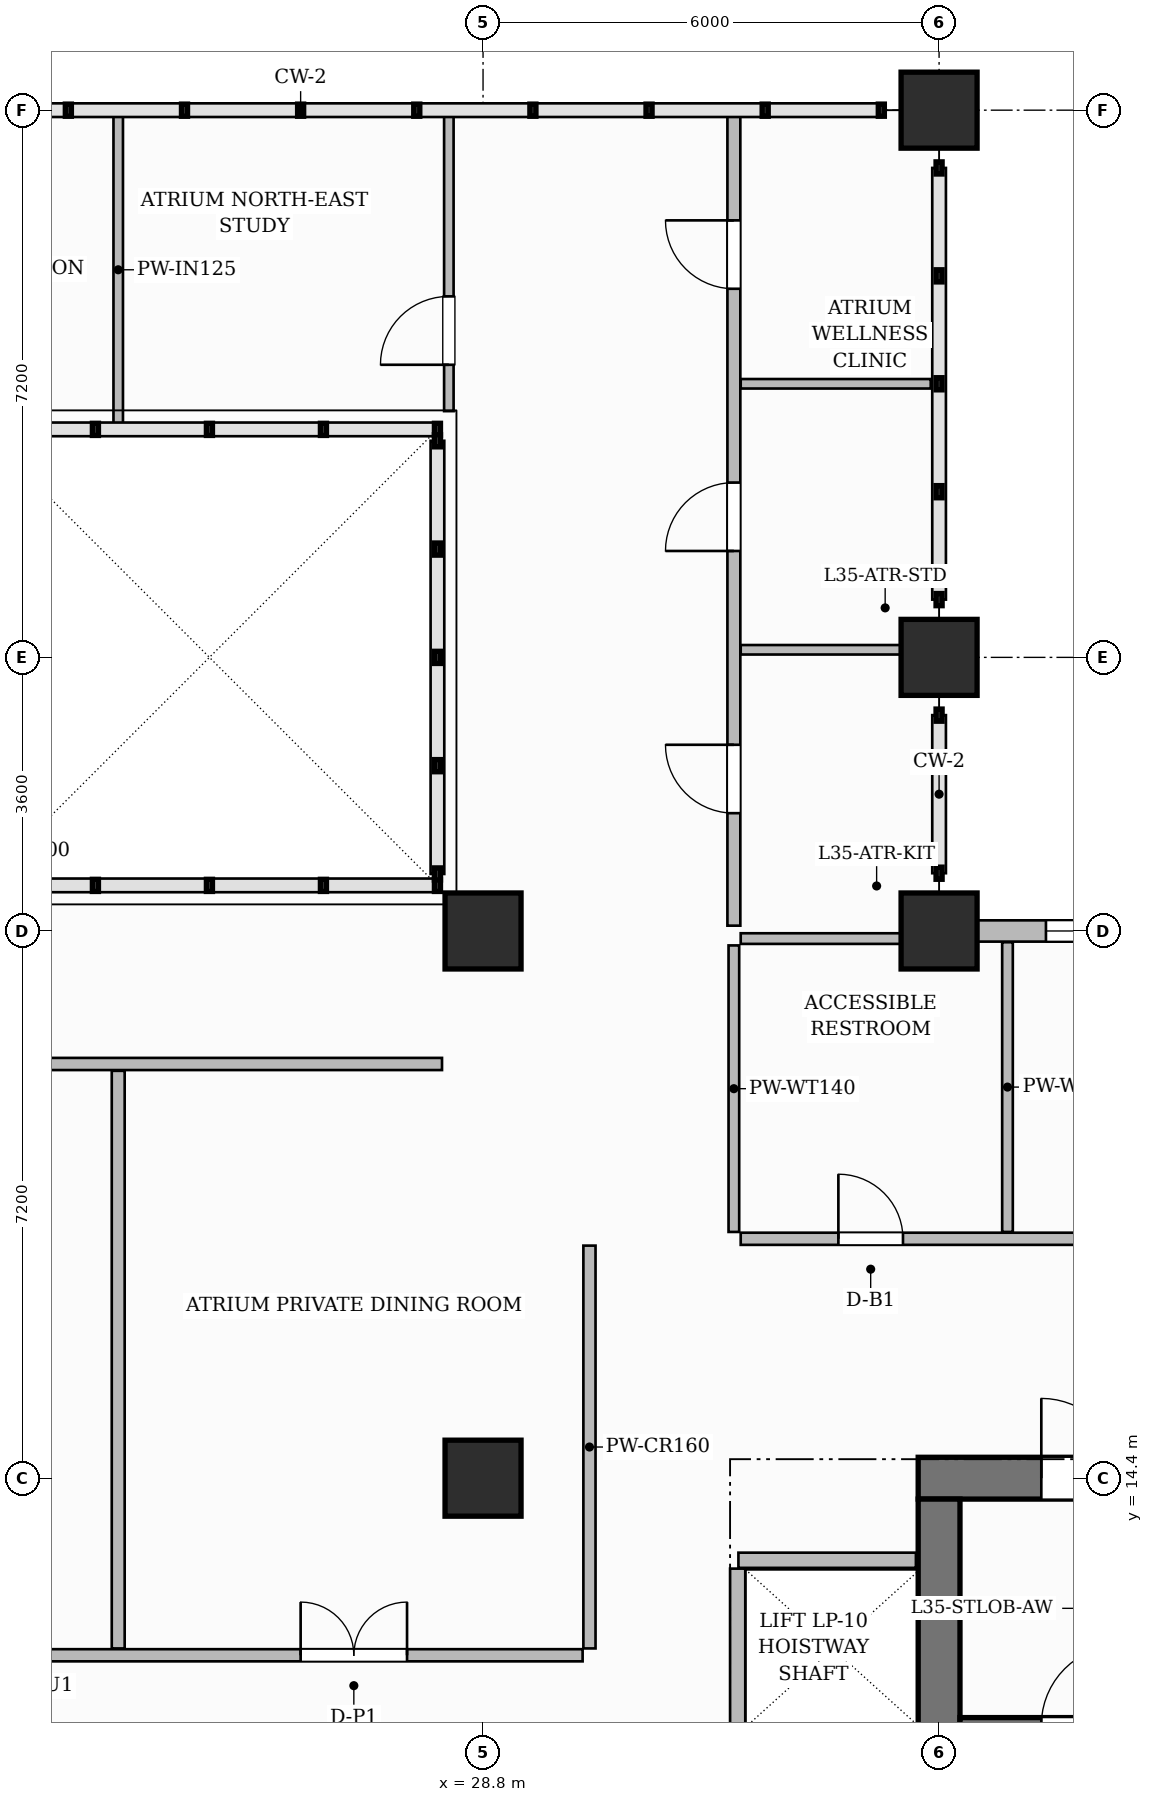
"""IFC4 building model, lengths in metres.
Left out: names, types, materials, properties, quantities, classifications, styles, units other than length and angle.
Written with IfcOpenShell. Run it as: python <this file> out.ifc"""

import sys

from ifc_helpers import new_model, si_unit, direction, frame, frame_2d, origin, origin_2d, place, context, subcontext, project, spatial, rectangle, extrude, source, transform, mapped, element, fill, save


model = new_model("IFC4")
c1 = context("Model", 3, precision=1e-05, world=origin(), true_north=direction((0.0, 1.0)))
c2 = subcontext(c1, "Body", "Model", "MODEL_VIEW")
j1 = project(units=[si_unit("LENGTHUNIT", "METRE"), si_unit("PLANEANGLEUNIT", "RADIAN")], contexts=[c1])
p1 = place(None, origin())
s1 = spatial("IfcSite", under=j1, at=p1, CompositionType="ELEMENT")
p2 = place(p1, origin())
s2 = spatial("IfcBuilding", under=s1, at=p2, CompositionType="ELEMENT")
p3 = place(p2, frame((0.0, 0.0, 141.4)))
s3 = spatial("IfcBuildingStorey", under=s2, at=p3, CompositionType="ELEMENT", Elevation=141.4)
p4 = place(p3, frame((34.525, 14.4, 0.0), z_axis=(0.0, 0.0, 1.0), x_axis=(1.0, 0.0, 0.0)))
e1 = element("IfcWall", 1, at=p4, inside=s3, PredefinedType="SHEAR", context=c2, shape_type="SweptSolid", body=[
    extrude(rectangle(XDim=15.55, YDim=0.55, at=frame_2d((7.775, 0.0))), origin(), (0.0, 0.0, 1.0), 3.7),
])
p5 = place(p4, frame((5.405, 0.0, 0.0)))
e2 = element("IfcOpeningElement", 2, at=p5, cuts=e1, PredefinedType="OPENING", context=c2, shape_type="SweptSolid", body=[
    extrude(rectangle(XDim=1.5, YDim=2.2, at=frame_2d((0.75, 1.1))), frame((0.0, 0.285, 0.0), z_axis=(0.0, -1.0, 0.0), x_axis=(1.0, 0.0, 0.0)), (0.0, 0.0, 1.0), 0.57),
])
p6 = place(p4, frame((1.62, 0.0, 0.0)))
e3 = element("IfcOpeningElement", 3, at=p6, cuts=e1, PredefinedType="OPENING", context=c2, shape_type="SweptSolid", body=[
    extrude(rectangle(XDim=1.05, YDim=2.15, at=frame_2d((0.525, 1.075))), frame((0.0, 0.285, 0.0), z_axis=(0.0, -1.0, 0.0), x_axis=(1.0, 0.0, 0.0)), (0.0, 0.0, 1.0), 0.57),
])
p7 = place(p4, frame((11.25, 0.0, 0.0)))
e4 = element("IfcOpeningElement", 4, at=p7, cuts=e1, PredefinedType="OPENING", context=c2, shape_type="SweptSolid", body=[
    extrude(rectangle(XDim=1.05, YDim=2.15, at=frame_2d((0.525, 1.075))), frame((0.0, 0.285, 0.0), z_axis=(0.0, -1.0, 0.0), x_axis=(1.0, 0.0, 0.0)), (0.0, 0.0, 1.0), 0.57),
])
p8 = place(p3, frame((34.8, 3.875, 0.0), z_axis=(0.0, 0.0, 1.0), x_axis=(0.0, 1.0, 0.0)))
e5 = element("IfcWall", 5, at=p8, inside=s3, PredefinedType="SHEAR", context=c2, shape_type="SweptSolid", body=[
    extrude(rectangle(XDim=10.25, YDim=0.55, at=frame_2d((5.125, 0.0))), origin(), (0.0, 0.0, 1.0), 3.7),
])
m1 = source(origin(), c2, "Body", "SweptSolid", [
    extrude(rectangle(XDim=1.0, YDim=1.0, at=origin_2d()), origin(), (0.0, 0.0, 1.0), 3.7),
])
for number, where, z_axis, x_axis in (
    (6, (28.8, 14.4, 0.0), (0.0, 0.0, 1.0), (1.0, 0.0, 0.0)),
    (7, (28.8, 21.6, 0.0), (0.0, 0.0, 1.0), (1.0, 0.0, 0.0)),
    (8, (34.8, 21.6, 0.0), (0.0, 0.0, 1.0), (1.0, 0.0, 0.0)),
    (9, (34.8, 25.2, 0.0), (0.0, 0.0, 1.0), (1.0, 0.0, 0.0)),
    (10, (34.8, 32.4, 0.0), (0.0, 0.0, 1.0), (1.0, 0.0, 0.0)),
):
    element("IfcColumn", number, at=place(p3, frame(where, z_axis=z_axis, x_axis=x_axis)), inside=s3, PredefinedType="COLUMN", context=c2, shape_type="MappedRepresentation", body=[
        mapped(m1, transform((0.0, 0.0, 0.0), scale=1.0)),
    ])
p9 = place(p3, frame((35.075, 11.15, 0.0), z_axis=(0.0, 0.0, 1.0), x_axis=(1.0, 0.0, 0.0)))
e11 = element("IfcWall", 11, at=p9, inside=s3, PredefinedType="SHEAR", context=c2, shape_type="SweptSolid", body=[
    extrude(rectangle(XDim=3.165, YDim=0.2, at=frame_2d((1.583, 0.0))), origin(), (0.0, 0.0, 1.0), 3.7),
])
p10 = place(p9, frame((1.07, 0.0, 0.0)))
e12 = element("IfcOpeningElement", 12, at=p10, cuts=e11, PredefinedType="OPENING", context=c2, shape_type="SweptSolid", body=[
    extrude(rectangle(XDim=1.05, YDim=2.2, at=frame_2d((0.525, 1.1))), frame((0.0, 0.11, 0.0), z_axis=(0.0, -1.0, 0.0), x_axis=(1.0, 0.0, 0.0)), (0.0, 0.0, 1.0), 0.22),
])
p11 = place(p3, frame((32.16, 13.32, 0.0), z_axis=(0.0, 0.0, 1.0), x_axis=(1.0, 0.0, 0.0)))
e13 = element("IfcWall", 13, at=p11, inside=s3, PredefinedType="PARTITIONING", context=c2, shape_type="SweptSolid", body=[
    extrude(rectangle(XDim=2.335, YDim=0.2, at=frame_2d((1.167, 0.0))), origin(), (0.0, 0.0, 1.0), 3.4),
])
p12 = place(p3, frame((32.15, 4.39, 0.0), z_axis=(0.0, 0.0, 1.0), x_axis=(0.0, 1.0, 0.0)))
e14 = element("IfcWall", 14, at=p12, inside=s3, PredefinedType="PARTITIONING", context=c2, shape_type="SweptSolid", body=[
    extrude(rectangle(XDim=8.82, YDim=0.2, at=frame_2d((4.41, 0.0))), origin(), (0.0, 0.0, 1.0), 3.4),
])
p13 = place(p3, frame((14.548, 12.07, 0.0), z_axis=(0.0, 0.0, 1.0), x_axis=(1.0, 0.0, 0.0)))
e15 = element("IfcWall", 15, at=p13, inside=s3, PredefinedType="PARTITIONING", context=c2, shape_type="SweptSolid", body=[
    extrude(rectangle(XDim=15.562, YDim=0.16, at=frame_2d((7.781, 0.0))), origin(), (0.0, 0.0, 1.0), 3.4),
])
p14 = place(p13, frame((6.702, 0.0, 0.0)))
e16 = element("IfcOpeningElement", 16, at=p14, cuts=e15, PredefinedType="OPENING", context=c2, shape_type="SweptSolid", body=[
    extrude(rectangle(XDim=1.05, YDim=2.25, at=frame_2d((0.525, 1.125))), frame((0.0, 0.09, 0.0), z_axis=(0.0, -1.0, 0.0), x_axis=(1.0, 0.0, 0.0)), (0.0, 0.0, 1.0), 0.18),
])
p15 = place(p13, frame((11.852, 0.0, 0.0)))
e17 = element("IfcOpeningElement", 17, at=p15, cuts=e15, PredefinedType="OPENING", context=c2, shape_type="SweptSolid", body=[
    extrude(rectangle(XDim=1.4, YDim=2.35, at=frame_2d((0.7, 1.175))), frame((0.0, 0.09, 0.0), z_axis=(0.0, -1.0, 0.0), x_axis=(1.0, 0.0, 0.0)), (0.0, 0.0, 1.0), 0.18),
])
p16 = place(p3, frame((30.2, 12.16, 0.0), z_axis=(0.0, 0.0, 1.0), x_axis=(0.0, 1.0, 0.0)))
e18 = element("IfcWall", 18, at=p16, inside=s3, PredefinedType="PARTITIONING", context=c2, shape_type="SweptSolid", body=[
    extrude(rectangle(XDim=5.3, YDim=0.16, at=frame_2d((2.65, 0.0))), origin(), (0.0, 0.0, 1.0), 3.4),
])
p17 = place(p3, frame((32.19, 17.55, 0.0), z_axis=(0.0, 0.0, 1.0), x_axis=(1.0, 0.0, 0.0)))
e19 = element("IfcWall", 19, at=p17, inside=s3, PredefinedType="PARTITIONING", context=c2, shape_type="SweptSolid", body=[
    extrude(rectangle(XDim=17.47, YDim=0.16, at=frame_2d((8.735, 0.0))), origin(), (0.0, 0.0, 1.0), 3.4),
])
p18 = place(p17, frame((1.285, 0.0, 0.0)))
e20 = element("IfcOpeningElement", 20, at=p18, cuts=e19, PredefinedType="OPENING", context=c2, shape_type="SweptSolid", body=[
    extrude(rectangle(XDim=0.85, YDim=2.1, at=frame_2d((0.425, 1.05))), frame((0.0, 0.09, 0.0), z_axis=(0.0, -1.0, 0.0), x_axis=(1.0, 0.0, 0.0)), (0.0, 0.0, 1.0), 0.18),
])
p19 = place(p17, frame((9.71, 0.0, 0.0)))
e21 = element("IfcOpeningElement", 21, at=p19, cuts=e19, PredefinedType="OPENING", context=c2, shape_type="SweptSolid", body=[
    extrude(rectangle(XDim=1.6, YDim=2.4, at=frame_2d((0.8, 1.2))), frame((0.0, 0.09, 0.0), z_axis=(0.0, -1.0, 0.0), x_axis=(1.0, 0.0, 0.0)), (0.0, 0.0, 1.0), 0.18),
])
p20 = place(p3, frame((32.1, 17.64, 0.0), z_axis=(0.0, 0.0, 1.0), x_axis=(0.0, 1.0, 0.0)))
e22 = element("IfcWall", 22, at=p20, inside=s3, PredefinedType="PARTITIONING", context=c2, shape_type="SweptSolid", body=[
    extrude(rectangle(XDim=3.77, YDim=0.14, at=frame_2d((1.885, 0.0))), origin(), (0.0, 0.0, 1.0), 3.4),
])
p21 = place(p3, frame((35.7, 17.64, 0.0), z_axis=(0.0, 0.0, 1.0), x_axis=(0.0, 1.0, 0.0)))
e23 = element("IfcWall", 23, at=p21, inside=s3, PredefinedType="PARTITIONING", context=c2, shape_type="SweptSolid", body=[
    extrude(rectangle(XDim=3.812, YDim=0.14, at=frame_2d((1.906, 0.0))), origin(), (0.0, 0.0, 1.0), 3.4),
])
p22 = place(p3, frame((24.0, 28.228, 0.0), z_axis=(0.0, 0.0, 1.0), x_axis=(0.0, 1.0, 0.0)))
e24 = element("IfcWall", 24, at=p22, inside=s3, PredefinedType="PARTITIONING", context=c2, shape_type="SweptSolid", body=[
    extrude(rectangle(XDim=4.144, YDim=0.125, at=frame_2d((2.072, 0.0))), origin(), (0.0, 0.0, 1.0), 3.4),
])
p23 = place(p3, frame((28.35, 28.44, 0.0), z_axis=(0.0, 0.0, 1.0), x_axis=(0.0, 1.0, 0.0)))
e25 = element("IfcWall", 25, at=p23, inside=s3, PredefinedType="PARTITIONING", context=c2, shape_type="SweptSolid", body=[
    extrude(rectangle(XDim=3.932, YDim=0.125, at=frame_2d((1.966, 0.0))), origin(), (0.0, 0.0, 1.0), 3.4),
])
p24 = place(p23, frame((0.61, 0.0, 0.0)))
e26 = element("IfcOpeningElement", 26, at=p24, cuts=e25, PredefinedType="OPENING", context=c2, shape_type="SweptSolid", body=[
    extrude(rectangle(XDim=0.9, YDim=2.15, at=frame_2d((0.45, 1.075))), frame((0.0, 0.073, 0.0), z_axis=(0.0, -1.0, 0.0), x_axis=(1.0, 0.0, 0.0)), (0.0, 0.0, 1.0), 0.145),
])
p25 = place(p3, frame((17.34, 19.85, 0.0), z_axis=(0.0, 0.0, 1.0), x_axis=(1.0, 0.0, 0.0)))
e27 = element("IfcWall", 27, at=p25, inside=s3, PredefinedType="PARTITIONING", context=c2, shape_type="SweptSolid", body=[
    extrude(rectangle(XDim=10.92, YDim=0.16, at=frame_2d((5.46, 0.0))), origin(), (0.0, 0.0, 1.0), 3.4),
])
p26 = place(p3, frame((32.19, 21.5, 0.0), z_axis=(0.0, 0.0, 1.0), x_axis=(1.0, 0.0, 0.0)))
e28 = element("IfcWall", 28, at=p26, inside=s3, PredefinedType="PARTITIONING", context=c2, shape_type="SweptSolid", body=[
    extrude(rectangle(XDim=2.42, YDim=0.14, at=frame_2d((1.21, 0.0))), origin(), (0.0, 0.0, 1.0), 2.885),
])
p27 = place(p3, frame((32.1, 21.67, 0.0), z_axis=(0.0, 0.0, 1.0), x_axis=(0.0, 1.0, 0.0)))
e29 = element("IfcWall", 29, at=p27, inside=s3, PredefinedType="PARTITIONING", context=c2, shape_type="SweptSolid", body=[
    extrude(rectangle(XDim=10.702, YDim=0.17, at=frame_2d((5.351, 0.0))), origin(), (0.0, 0.0, 1.0), 3.4),
])
p28 = place(p27, frame((1.48, 0.0, 0.0)))
e30 = element("IfcOpeningElement", 30, at=p28, cuts=e29, PredefinedType="OPENING", context=c2, shape_type="SweptSolid", body=[
    extrude(rectangle(XDim=0.9, YDim=2.15, at=frame_2d((0.45, 1.075))), frame((0.0, 0.095, 0.0), z_axis=(0.0, -1.0, 0.0), x_axis=(1.0, 0.0, 0.0)), (0.0, 0.0, 1.0), 0.19),
])
p29 = place(p27, frame((4.93, 0.0, 0.0)))
e31 = element("IfcOpeningElement", 31, at=p29, cuts=e29, PredefinedType="OPENING", context=c2, shape_type="SweptSolid", body=[
    extrude(rectangle(XDim=0.9, YDim=2.15, at=frame_2d((0.45, 1.075))), frame((0.0, 0.095, 0.0), z_axis=(0.0, -1.0, 0.0), x_axis=(1.0, 0.0, 0.0)), (0.0, 0.0, 1.0), 0.19),
])
p30 = place(p27, frame((8.38, 0.0, 0.0)))
e32 = element("IfcOpeningElement", 32, at=p30, cuts=e29, PredefinedType="OPENING", context=c2, shape_type="SweptSolid", body=[
    extrude(rectangle(XDim=0.9, YDim=2.15, at=frame_2d((0.45, 1.075))), frame((0.0, 0.095, 0.0), z_axis=(0.0, -1.0, 0.0), x_axis=(1.0, 0.0, 0.0)), (0.0, 0.0, 1.0), 0.19),
])
for number, where, z_axis, x_axis in (
    (33, (32.19, 25.3, 0.0), (0.0, 0.0, 1.0), (1.0, 0.0, 0.0)),
    (34, (32.19, 28.8, 0.0), (0.0, 0.0, 1.0), (1.0, 0.0, 0.0)),
):
    element("IfcWall", number, at=place(p3, frame(where, z_axis=z_axis, x_axis=x_axis)), inside=s3, PredefinedType="PARTITIONING", context=c2, shape_type="SweptSolid", body=[
        extrude(rectangle(XDim=2.5, YDim=0.125, at=frame_2d((1.25, 0.0))), origin(), (0.0, 0.0, 1.0), 3.4),
    ])
p31 = place(p3, frame((24.0, 12.16, 0.0), z_axis=(0.0, 0.0, 1.0), x_axis=(0.0, 1.0, 0.0)))
e35 = element("IfcWall", 35, at=p31, inside=s3, PredefinedType="PARTITIONING", context=c2, shape_type="SweptSolid", body=[
    extrude(rectangle(XDim=7.6, YDim=0.17, at=frame_2d((3.8, 0.0))), origin(), (0.0, 0.0, 1.0), 3.4),
])
p32 = place(p3, frame((34.8, 21.6, 0.0), z_axis=(0.0, 0.0, 1.0), x_axis=(1.0, 0.0, 0.0)))
e36 = element("IfcWall", 36, at=p32, inside=s3, PredefinedType="SOLIDWALL", context=c2, shape_type="SweptSolid", body=[
    extrude(rectangle(XDim=15.0, YDim=0.28, at=frame_2d((7.5, 0.0))), origin(), (0.0, 0.0, 1.0), 2.885),
])
p33 = place(p32, frame((1.406, 0.0, 0.8)))
e37 = element("IfcOpeningElement", 37, at=p33, cuts=e36, PredefinedType="OPENING", context=c2, shape_type="SweptSolid", body=[
    extrude(rectangle(XDim=1.8, YDim=1.85, at=frame_2d((0.9, 0.925))), frame((0.0, 0.15, 0.0), z_axis=(0.0, -1.0, 0.0), x_axis=(1.0, 0.0, 0.0)), (0.0, 0.0, 1.0), 0.3),
])
p34 = place(p32, frame((4.102, 0.0, 0.8)))
e38 = element("IfcOpeningElement", 38, at=p34, cuts=e36, PredefinedType="OPENING", context=c2, shape_type="SweptSolid", body=[
    extrude(rectangle(XDim=1.8, YDim=1.85, at=frame_2d((0.9, 0.925))), frame((0.0, 0.15, 0.0), z_axis=(0.0, -1.0, 0.0), x_axis=(1.0, 0.0, 0.0)), (0.0, 0.0, 1.0), 0.3),
])
p35 = place(p32, frame((8.675, 0.0, 0.8)))
e39 = element("IfcOpeningElement", 39, at=p35, cuts=e36, PredefinedType="OPENING", context=c2, shape_type="SweptSolid", body=[
    extrude(rectangle(XDim=1.8, YDim=1.85, at=frame_2d((0.9, 0.925))), frame((0.0, 0.15, 0.0), z_axis=(0.0, -1.0, 0.0), x_axis=(1.0, 0.0, 0.0)), (0.0, 0.0, 1.0), 0.3),
])
p36 = place(p32, frame((11.725, 0.0, 0.8)))
e40 = element("IfcOpeningElement", 40, at=p36, cuts=e36, PredefinedType="OPENING", context=c2, shape_type="SweptSolid", body=[
    extrude(rectangle(XDim=1.8, YDim=1.85, at=frame_2d((0.9, 0.925))), frame((0.0, 0.15, 0.0), z_axis=(0.0, -1.0, 0.0), x_axis=(1.0, 0.0, 0.0)), (0.0, 0.0, 1.0), 0.3),
])
m2 = source(origin(), c2, "Body", "SweptSolid", [
    extrude(rectangle(XDim=1.05, YDim=2.15, at=frame_2d((0.525, 1.075))), frame((0.0, 0.025, 0.0), z_axis=(0.0, -1.0, 0.0), x_axis=(1.0, 0.0, 0.0)), (0.0, 0.0, 1.0), 0.05),
])
p37 = place(p6, origin())
e41 = element("IfcDoor", 41, at=p37, inside=s3, OperationType="SINGLE_SWING_LEFT", PredefinedType="DOOR", context=c2, shape_type="MappedRepresentation", body=[
    mapped(m2, transform((0.0, 0.0, 0.0), scale=1.0)),
])
fill(e3, e41)
m3 = source(origin(), c2, "Body", "SweptSolid", [
    extrude(rectangle(XDim=0.85, YDim=2.1, at=frame_2d((0.425, 1.05))), frame((0.0, 0.025, 0.0), z_axis=(0.0, -1.0, 0.0), x_axis=(1.0, 0.0, 0.0)), (0.0, 0.0, 1.0), 0.05),
])
p38 = place(p18, origin())
e42 = element("IfcDoor", 42, at=p38, inside=s3, OperationType="SINGLE_SWING_LEFT", PredefinedType="DOOR", context=c2, shape_type="MappedRepresentation", body=[
    mapped(m3, transform((0.0, 0.0, 0.0), scale=1.0)),
])
fill(e20, e42)
m4 = source(origin(), c2, "Body", "SweptSolid", [
    extrude(rectangle(XDim=0.9, YDim=2.15, at=frame_2d((0.45, 1.075))), frame((0.0, 0.025, 0.0), z_axis=(0.0, -1.0, 0.0), x_axis=(1.0, 0.0, 0.0)), (0.0, 0.0, 1.0), 0.05),
])
p39 = place(p24, origin())
e43 = element("IfcDoor", 43, at=p39, inside=s3, OperationType="SINGLE_SWING_LEFT", PredefinedType="DOOR", context=c2, shape_type="MappedRepresentation", body=[
    mapped(m4, transform((0.0, 0.0, 0.0), scale=1.0)),
])
fill(e26, e43)
p40 = place(p28, origin())
e44 = element("IfcDoor", 44, at=p40, inside=s3, OperationType="SINGLE_SWING_RIGHT", PredefinedType="DOOR", context=c2, shape_type="MappedRepresentation", body=[
    mapped(m4, transform((0.0, 0.0, 0.0), scale=1.0)),
])
fill(e30, e44)
p41 = place(p29, origin())
e45 = element("IfcDoor", 45, at=p41, inside=s3, OperationType="SINGLE_SWING_LEFT", PredefinedType="DOOR", context=c2, shape_type="MappedRepresentation", body=[
    mapped(m4, transform((0.0, 0.0, 0.0), scale=1.0)),
])
fill(e31, e45)
p42 = place(p30, origin())
e46 = element("IfcDoor", 46, at=p42, inside=s3, OperationType="SINGLE_SWING_RIGHT", PredefinedType="DOOR", context=c2, shape_type="MappedRepresentation", body=[
    mapped(m4, transform((0.0, 0.0, 0.0), scale=1.0)),
])
fill(e32, e46)
m5 = source(origin(), c2, "Body", "SweptSolid", [
    extrude(rectangle(XDim=1.4, YDim=2.35, at=frame_2d((0.7, 1.175))), frame((0.0, 0.025, 0.0), z_axis=(0.0, -1.0, 0.0), x_axis=(1.0, 0.0, 0.0)), (0.0, 0.0, 1.0), 0.05),
])
p43 = place(p15, origin())
e47 = element("IfcDoor", 47, at=p43, inside=s3, OperationType="DOUBLE_DOOR_SINGLE_SWING", PredefinedType="DOOR", context=c2, shape_type="MappedRepresentation", body=[
    mapped(m5, transform((0.0, 0.0, 0.0), scale=1.0)),
])
fill(e17, e47)
m6 = source(origin(), c2, "Body", "SweptSolid", [
    extrude(rectangle(XDim=1.8, YDim=1.85, at=frame_2d((0.9, 0.925))), frame((0.0, 0.03, 0.0), z_axis=(0.0, -1.0, 0.0), x_axis=(1.0, 0.0, 0.0)), (0.0, 0.0, 1.0), 0.06),
])
p44 = place(p33, origin())
e48 = element("IfcWindow", 48, at=p44, inside=s3, PartitioningType="DOUBLE_PANEL_VERTICAL", PredefinedType="WINDOW", context=c2, shape_type="MappedRepresentation", body=[
    mapped(m6, transform((0.0, 0.0, 0.0), scale=1.0)),
])
fill(e37, e48)
save(model, sys.argv[1])
